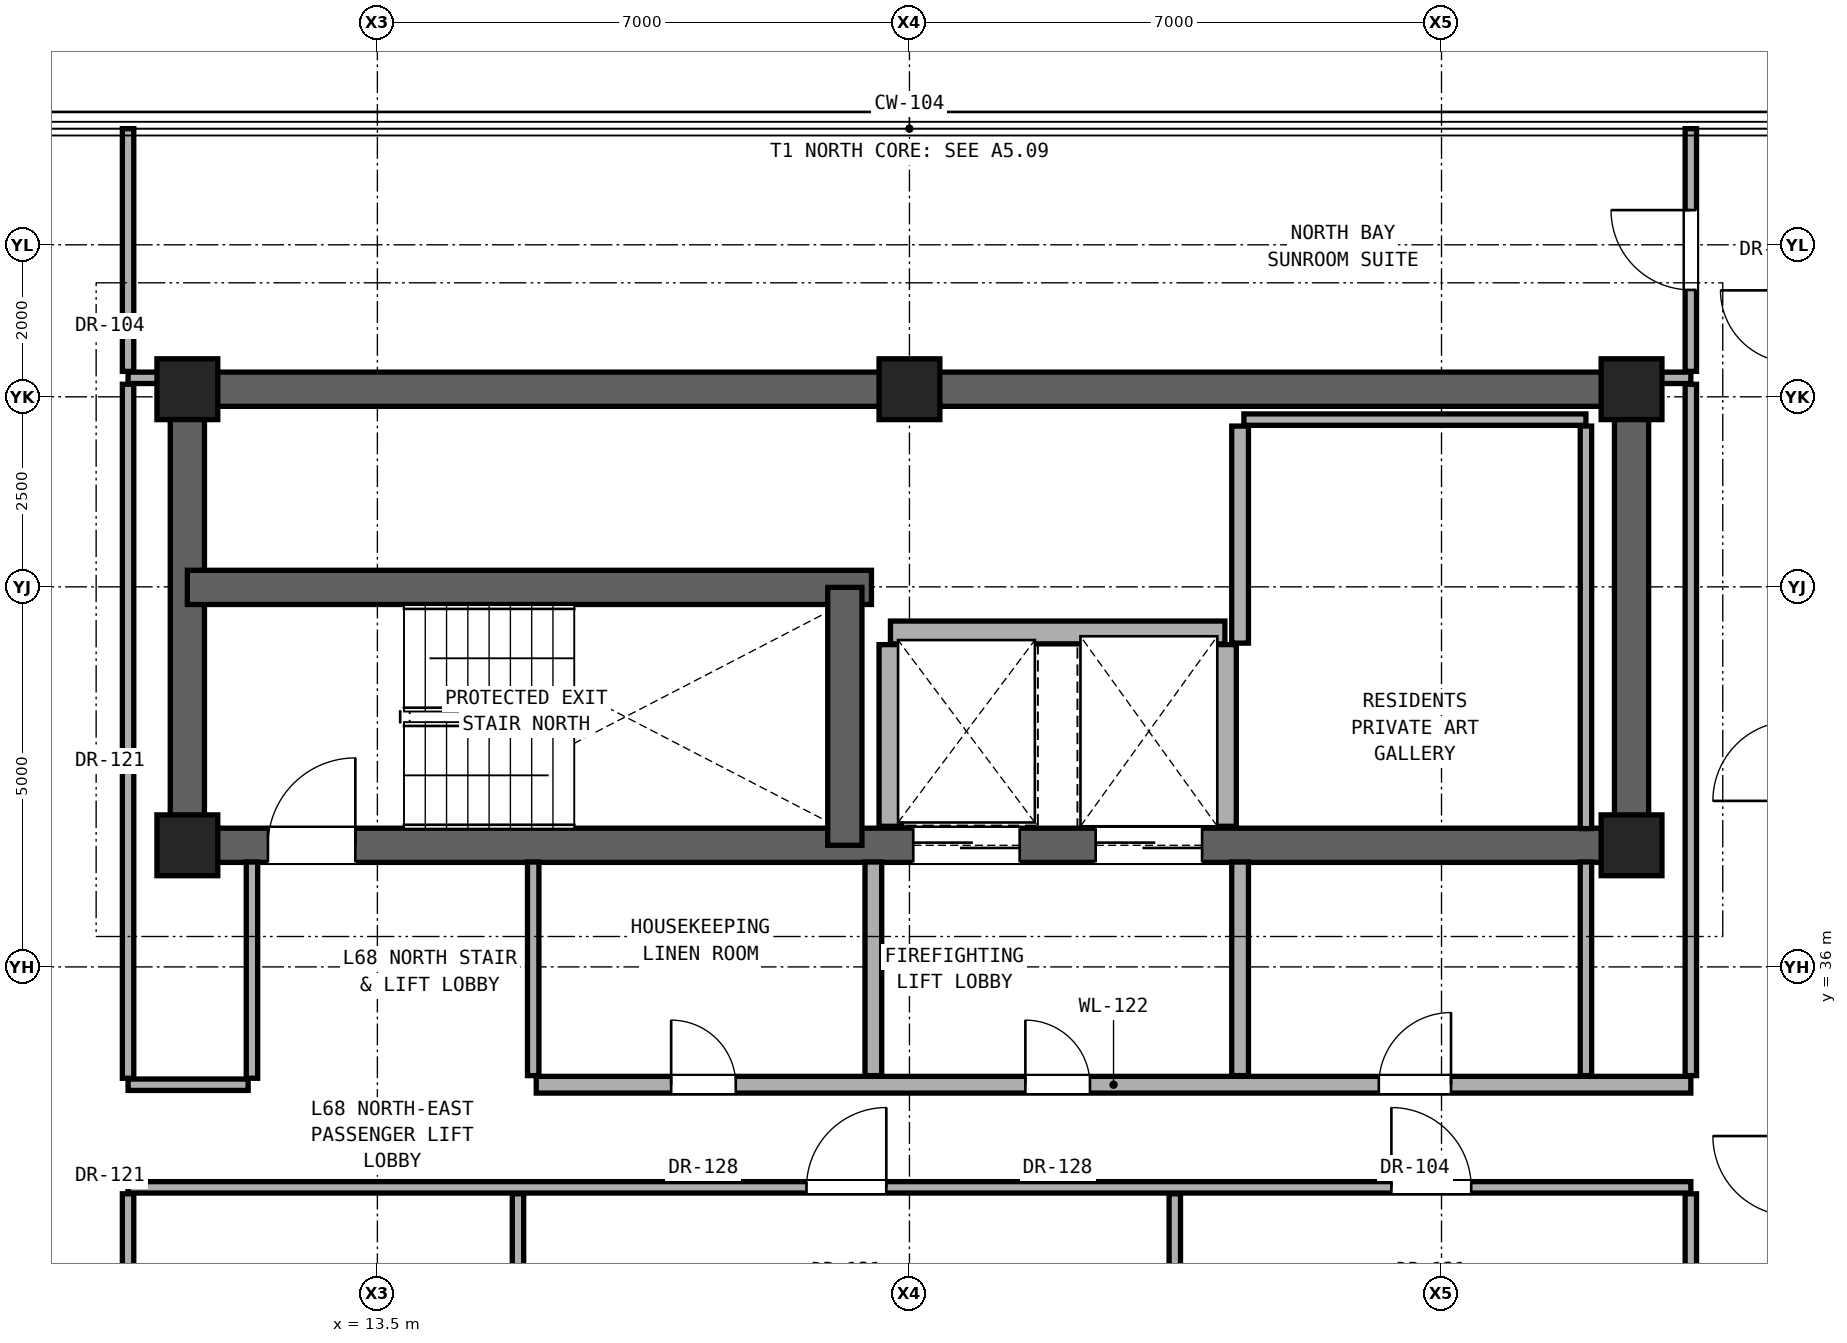
"""IFC4 building model, lengths in metres.
Left out: names, types, materials, properties, quantities, classifications, styles, units other than length and angle.
Written with IfcOpenShell. Run it as: python <this file> out.ifc"""

import sys

from ifc_helpers import new_model, si_unit, direction, frame, frame_2d, origin, origin_2d, place, context, subcontext, project, spatial, rectangle, extrude, element, fill, save


model = new_model("IFC4")
c1 = context("Model", 3, precision=1e-05, world=origin(), true_north=direction((0.0, 1.0)))
c2 = subcontext(c1, "Body", "Model", "MODEL_VIEW")
j1 = project(units=[si_unit("LENGTHUNIT", "METRE"), si_unit("PLANEANGLEUNIT", "RADIAN")], contexts=[c1])
p1 = place(None, origin())
s1 = spatial("IfcSite", under=j1, at=p1, CompositionType="ELEMENT")
p2 = place(p1, origin())
s2 = spatial("IfcBuilding", under=s1, at=p2, CompositionType="ELEMENT")
p3 = place(p2, frame((0.0, 0.0, 239.2)))
s3 = spatial("IfcBuildingStorey", under=s2, at=p3, CompositionType="ELEMENT", Elevation=239.2)
for number, where, z_axis, x_axis in (
    (1, (11.0, 37.6, 0.0), (0.0, 0.0, 1.0), (1.0, 0.0, 0.0)),
    (2, (30.0, 37.6, 0.0), (0.0, 0.0, 1.0), (1.0, 0.0, 0.0)),
    (3, (11.0, 43.6, 0.0), (0.0, 0.0, 1.0), (1.0, 0.0, 0.0)),
    (4, (20.5, 43.6, 0.0), (0.0, 0.0, 1.0), (1.0, 0.0, 0.0)),
    (5, (30.0, 43.6, 0.0), (0.0, 0.0, 1.0), (1.0, 0.0, 0.0)),
):
    element("IfcColumn", number, at=place(p3, frame(where, z_axis=z_axis, x_axis=x_axis)), inside=s3, PredefinedType="COLUMN", context=c2, shape_type="SweptSolid", body=[
        extrude(rectangle(XDim=0.8, YDim=0.8, at=origin_2d()), origin(), (0.0, 0.0, 1.0), 3.3),
    ])
p4 = place(p3, frame((11.0, 43.6, 0.0), z_axis=(0.0, 0.0, 1.0), x_axis=(1.0, 0.0, 0.0)))
e6 = element("IfcWall", 6, at=p4, inside=s3, PredefinedType="SHEAR", context=c2, shape_type="SweptSolid", body=[
    extrude(rectangle(XDim=19.0, YDim=0.45, at=frame_2d((9.5, 0.0))), origin(), (0.0, 0.0, 1.0), 3.1),
])
for number, where, z_axis, x_axis in (
    (7, (11.0, 37.6, 0.0), (0.0, 0.0, 1.0), (0.0, 1.0, 0.0)),
    (8, (30.0, 37.6, 0.0), (0.0, 0.0, 1.0), (0.0, 1.0, 0.0)),
):
    element("IfcWall", number, at=place(p3, frame(where, z_axis=z_axis, x_axis=x_axis)), inside=s3, PredefinedType="SHEAR", context=c2, shape_type="SweptSolid", body=[
        extrude(rectangle(XDim=6.0, YDim=0.45, at=frame_2d((3.0, 0.0))), origin(), (0.0, 0.0, 1.0), 3.1),
    ])
p5 = place(p3, frame((11.0, 37.6, 0.0), z_axis=(0.0, 0.0, 1.0), x_axis=(1.0, 0.0, 0.0)))
e9 = element("IfcWall", 9, at=p5, inside=s3, PredefinedType="SHEAR", context=c2, shape_type="SweptSolid", body=[
    extrude(rectangle(XDim=19.0, YDim=0.45, at=frame_2d((9.5, 0.0))), origin(), (0.0, 0.0, 1.0), 3.1),
])
p6 = place(p5, frame((1.06, 0.0, 0.0)))
e10 = element("IfcOpeningElement", 10, at=p6, cuts=e9, PredefinedType="OPENING", context=c2, shape_type="SweptSolid", body=[
    extrude(rectangle(XDim=1.15, YDim=2.2, at=frame_2d((0.575, 1.1))), frame((0.0, 0.235, 0.0), z_axis=(0.0, -1.0, 0.0), x_axis=(1.0, 0.0, 0.0)), (0.0, 0.0, 1.0), 0.47),
])
p7 = place(p5, frame((9.55, 0.0, 0.0)))
e11 = element("IfcOpeningElement", 11, at=p7, cuts=e9, PredefinedType="OPENING", context=c2, shape_type="SweptSolid", body=[
    extrude(rectangle(XDim=1.4, YDim=2.35, at=frame_2d((0.7, 1.175))), frame((0.0, 0.235, 0.0), z_axis=(0.0, -1.0, 0.0), x_axis=(1.0, 0.0, 0.0)), (0.0, 0.0, 1.0), 0.47),
])
p8 = place(p5, frame((11.95, 0.0, 0.0)))
e12 = element("IfcOpeningElement", 12, at=p8, cuts=e9, PredefinedType="OPENING", context=c2, shape_type="SweptSolid", body=[
    extrude(rectangle(XDim=1.4, YDim=2.35, at=frame_2d((0.7, 1.175))), frame((0.0, 0.235, 0.0), z_axis=(0.0, -1.0, 0.0), x_axis=(1.0, 0.0, 0.0)), (0.0, 0.0, 1.0), 0.47),
])
p9 = place(p3, frame((11.0, 40.993, 0.0), z_axis=(0.0, 0.0, 1.0), x_axis=(1.0, 0.0, 0.0)))
e13 = element("IfcWall", 13, at=p9, inside=s3, PredefinedType="SHEAR", context=c2, shape_type="SweptSolid", body=[
    extrude(rectangle(XDim=9.0, YDim=0.45, at=frame_2d((4.5, 0.0))), origin(), (0.0, 0.0, 1.0), 3.1),
])
p10 = place(p3, frame((19.65, 37.6, 0.0), z_axis=(0.0, 0.0, 1.0), x_axis=(0.0, 1.0, 0.0)))
e14 = element("IfcWall", 14, at=p10, inside=s3, PredefinedType="SHEAR", context=c2, shape_type="SweptSolid", body=[
    extrude(rectangle(XDim=3.393, YDim=0.45, at=frame_2d((1.696, 0.0))), origin(), (0.0, 0.0, 1.0), 3.1),
])
p11 = place(p3, frame((10.22, 33.1, 0.0), z_axis=(0.0, 0.0, 1.0), x_axis=(1.0, 0.0, 0.0)))
e15 = element("IfcWall", 15, at=p11, inside=s3, PredefinedType="PARTITIONING", context=c2, shape_type="SweptSolid", body=[
    extrude(rectangle(XDim=20.56, YDim=0.15, at=frame_2d((10.28, 0.0))), origin(), (0.0, 0.0, 1.0), 2.236),
])
p12 = place(p11, frame((8.926, 0.0, 0.0)))
e16 = element("IfcOpeningElement", 16, at=p12, cuts=e15, PredefinedType="OPENING", context=c2, shape_type="SweptSolid", body=[
    extrude(rectangle(XDim=1.05, YDim=2.2, at=frame_2d((0.525, 1.1))), frame((0.0, 0.085, 0.0), z_axis=(0.0, -1.0, 0.0), x_axis=(1.0, 0.0, 0.0)), (0.0, 0.0, 1.0), 0.17),
])
p13 = place(p11, frame((16.621, 0.0, 0.0)))
e17 = element("IfcOpeningElement", 17, at=p13, cuts=e15, PredefinedType="OPENING", context=c2, shape_type="SweptSolid", body=[
    extrude(rectangle(XDim=1.05, YDim=2.2, at=frame_2d((0.525, 1.1))), frame((0.0, 0.085, 0.0), z_axis=(0.0, -1.0, 0.0), x_axis=(1.0, 0.0, 0.0)), (0.0, 0.0, 1.0), 0.17),
])
p14 = place(p3, frame((10.22, 34.45, 0.0), z_axis=(0.0, 0.0, 1.0), x_axis=(1.0, 0.0, 0.0)))
e18 = element("IfcWall", 18, at=p14, inside=s3, PredefinedType="PARTITIONING", context=c2, shape_type="SweptSolid", body=[
    extrude(rectangle(XDim=1.58, YDim=0.15, at=frame_2d((0.79, 0.0))), origin(), (0.0, 0.0, 1.0), 2.236),
])
p15 = place(p3, frame((15.59, 34.45, 0.0), z_axis=(0.0, 0.0, 1.0), x_axis=(1.0, 0.0, 0.0)))
e19 = element("IfcWall", 19, at=p15, inside=s3, PredefinedType="SOLIDWALL", context=c2, shape_type="SweptSolid", body=[
    extrude(rectangle(XDim=15.19, YDim=0.22, at=frame_2d((7.595, 0.0))), origin(), (0.0, 0.0, 1.0), 2.236),
])
p16 = place(p15, frame((6.435, 0.0, 0.0)))
e20 = element("IfcOpeningElement", 20, at=p16, cuts=e19, PredefinedType="OPENING", context=c2, shape_type="SweptSolid", body=[
    extrude(rectangle(XDim=0.85, YDim=2.01, at=frame_2d((0.425, 1.005))), frame((0.0, 0.12, 0.0), z_axis=(0.0, -1.0, 0.0), x_axis=(1.0, 0.0, 0.0)), (0.0, 0.0, 1.0), 0.24),
])
p17 = place(p15, frame((11.085, 0.0, 0.0)))
e21 = element("IfcOpeningElement", 21, at=p17, cuts=e19, PredefinedType="OPENING", context=c2, shape_type="SweptSolid", body=[
    extrude(rectangle(XDim=0.95, YDim=2.15, at=frame_2d((0.475, 1.075))), frame((0.0, 0.12, 0.0), z_axis=(0.0, -1.0, 0.0), x_axis=(1.0, 0.0, 0.0)), (0.0, 0.0, 1.0), 0.24),
])
p18 = place(p15, frame((1.775, 0.0, 0.0)))
e22 = element("IfcOpeningElement", 22, at=p18, cuts=e19, PredefinedType="OPENING", context=c2, shape_type="SweptSolid", body=[
    extrude(rectangle(XDim=0.85, YDim=2.01, at=frame_2d((0.425, 1.005))), frame((0.0, 0.12, 0.0), z_axis=(0.0, -1.0, 0.0), x_axis=(1.0, 0.0, 0.0)), (0.0, 0.0, 1.0), 0.24),
])
p19 = place(p3, frame((20.25, 40.4, 0.0), z_axis=(0.0, 0.0, 1.0), x_axis=(1.0, 0.0, 0.0)))
e23 = element("IfcWall", 23, at=p19, inside=s3, PredefinedType="SOLIDWALL", context=c2, shape_type="SweptSolid", body=[
    extrude(rectangle(XDim=4.4, YDim=0.3, at=frame_2d((2.2, 0.0))), origin(), (0.0, 0.0, 1.0), 3.1),
])
p20 = place(p3, frame((24.9, 43.2, 0.0), z_axis=(0.0, 0.0, 1.0), x_axis=(1.0, 0.0, 0.0)))
e24 = element("IfcWall", 24, at=p20, inside=s3, PredefinedType="PARTITIONING", context=c2, shape_type="SweptSolid", body=[
    extrude(rectangle(XDim=4.5, YDim=0.15, at=frame_2d((2.25, 0.0))), origin(), (0.0, 0.0, 1.0), 3.1),
])
for number, where, z_axis, x_axis in (
    (25, (10.22, 43.75, 0.0), (0.0, 0.0, 1.0), (1.0, 0.0, 0.0)),
    (26, (30.22, 43.75, 0.0), (0.0, 0.0, 1.0), (1.0, 0.0, 0.0)),
):
    element("IfcWall", number, at=place(p3, frame(where, z_axis=z_axis, x_axis=x_axis)), inside=s3, PredefinedType="PARTITIONING", context=c2, shape_type="SweptSolid", body=[
        extrude(rectangle(XDim=0.56, YDim=0.15, at=frame_2d((0.28, 0.0))), origin(), (0.0, 0.0, 1.0), 3.1),
    ])
p21 = place(p3, frame((10.22, 22.935, 0.0), z_axis=(0.0, 0.0, 1.0), x_axis=(0.0, 1.0, 0.0)))
e27 = element("IfcWall", 27, at=p21, inside=s3, PredefinedType="PARTITIONING", context=c2, shape_type="SweptSolid", body=[
    extrude(rectangle(XDim=10.08, YDim=0.15, at=frame_2d((5.04, 0.0))), origin(), (0.0, 0.0, 1.0), 2.396),
])
p22 = place(p21, frame((4.565, 0.0, 0.0)))
e28 = element("IfcOpeningElement", 28, at=p22, cuts=e27, PredefinedType="OPENING", context=c2, shape_type="SweptSolid", body=[
    extrude(rectangle(XDim=0.95, YDim=2.15, at=frame_2d((0.475, 1.075))), frame((0.0, 0.085, 0.0), z_axis=(0.0, -1.0, 0.0), x_axis=(1.0, 0.0, 0.0)), (0.0, 0.0, 1.0), 0.17),
])
p23 = place(p3, frame((10.22, 34.535, 0.0), z_axis=(0.0, 0.0, 1.0), x_axis=(0.0, 1.0, 0.0)))
e29 = element("IfcWall", 29, at=p23, inside=s3, PredefinedType="PARTITIONING", context=c2, shape_type="SweptSolid", body=[
    extrude(rectangle(XDim=9.13, YDim=0.15, at=frame_2d((4.565, 0.0))), origin(), (0.0, 0.0, 1.0), 2.492),
])
p24 = place(p3, frame((10.22, 43.835, 0.0), z_axis=(0.0, 0.0, 1.0), x_axis=(0.0, 1.0, 0.0)))
e30 = element("IfcWall", 30, at=p24, inside=s3, PredefinedType="PARTITIONING", context=c2, shape_type="SweptSolid", body=[
    extrude(rectangle(XDim=3.193, YDim=0.15, at=frame_2d((1.597, 0.0))), origin(), (0.0, 0.0, 1.0), 3.1),
])
p25 = place(p3, frame((11.85, 34.535, 0.0), z_axis=(0.0, 0.0, 1.0), x_axis=(0.0, 1.0, 0.0)))
e31 = element("IfcWall", 31, at=p25, inside=s3, PredefinedType="PARTITIONING", context=c2, shape_type="SweptSolid", body=[
    extrude(rectangle(XDim=2.845, YDim=0.15, at=frame_2d((1.422, 0.0))), origin(), (0.0, 0.0, 1.0), 3.1),
])
p26 = place(p3, frame((15.35, 25.925, 0.0), z_axis=(0.0, 0.0, 1.0), x_axis=(0.0, 1.0, 0.0)))
e32 = element("IfcWall", 32, at=p26, inside=s3, PredefinedType="PARTITIONING", context=c2, shape_type="SweptSolid", body=[
    extrude(rectangle(XDim=7.09, YDim=0.15, at=frame_2d((3.545, 0.0))), origin(), (0.0, 0.0, 1.0), 2.236),
])
p27 = place(p3, frame((15.55, 34.57, 0.0), z_axis=(0.0, 0.0, 1.0), x_axis=(0.0, 1.0, 0.0)))
e33 = element("IfcWall", 33, at=p27, inside=s3, PredefinedType="PARTITIONING", context=c2, shape_type="SweptSolid", body=[
    extrude(rectangle(XDim=2.81, YDim=0.15, at=frame_2d((1.405, 0.0))), origin(), (0.0, 0.0, 1.0), 3.1),
])
p28 = place(p3, frame((20.025, 34.57, 0.0), z_axis=(0.0, 0.0, 1.0), x_axis=(0.0, 1.0, 0.0)))
e34 = element("IfcWall", 34, at=p28, inside=s3, PredefinedType="SOLIDWALL", context=c2, shape_type="SweptSolid", body=[
    extrude(rectangle(XDim=2.81, YDim=0.22, at=frame_2d((1.405, 0.0))), origin(), (0.0, 0.0, 1.0), 3.1),
])
p29 = place(p3, frame((20.25, 37.85, 0.0), z_axis=(0.0, 0.0, 1.0), x_axis=(0.0, 1.0, 0.0)))
e35 = element("IfcWall", 35, at=p29, inside=s3, PredefinedType="SOLIDWALL", context=c2, shape_type="SweptSolid", body=[
    extrude(rectangle(XDim=2.39, YDim=0.3, at=frame_2d((1.195, 0.0))), origin(), (0.0, 0.0, 1.0), 3.1),
])
p30 = place(p3, frame((23.991, 25.925, 0.0), z_axis=(0.0, 0.0, 1.0), x_axis=(0.0, 1.0, 0.0)))
e36 = element("IfcWall", 36, at=p30, inside=s3, PredefinedType="PARTITIONING", context=c2, shape_type="SweptSolid", body=[
    extrude(rectangle(XDim=7.09, YDim=0.15, at=frame_2d((3.545, 0.0))), origin(), (0.0, 0.0, 1.0), 2.236),
])
p31 = place(p3, frame((24.65, 37.85, 0.0), z_axis=(0.0, 0.0, 1.0), x_axis=(0.0, 1.0, 0.0)))
e37 = element("IfcWall", 37, at=p31, inside=s3, PredefinedType="SOLIDWALL", context=c2, shape_type="SweptSolid", body=[
    extrude(rectangle(XDim=2.39, YDim=0.3, at=frame_2d((1.195, 0.0))), origin(), (0.0, 0.0, 1.0), 3.1),
])
p32 = place(p3, frame((24.85, 34.57, 0.0), z_axis=(0.0, 0.0, 1.0), x_axis=(0.0, 1.0, 0.0)))
e38 = element("IfcWall", 38, at=p32, inside=s3, PredefinedType="SOLIDWALL", context=c2, shape_type="SweptSolid", body=[
    extrude(rectangle(XDim=2.81, YDim=0.22, at=frame_2d((1.405, 0.0))), origin(), (0.0, 0.0, 1.0), 3.1),
])
p33 = place(p3, frame((24.85, 40.26, 0.0), z_axis=(0.0, 0.0, 1.0), x_axis=(0.0, 1.0, 0.0)))
e39 = element("IfcWall", 39, at=p33, inside=s3, PredefinedType="SOLIDWALL", context=c2, shape_type="SweptSolid", body=[
    extrude(rectangle(XDim=2.855, YDim=0.22, at=frame_2d((1.427, 0.0))), origin(), (0.0, 0.0, 1.0), 3.1),
])
p34 = place(p3, frame((29.4, 34.57, 0.0), z_axis=(0.0, 0.0, 1.0), x_axis=(0.0, 1.0, 0.0)))
e40 = element("IfcWall", 40, at=p34, inside=s3, PredefinedType="PARTITIONING", context=c2, shape_type="SweptSolid", body=[
    extrude(rectangle(XDim=2.81, YDim=0.15, at=frame_2d((1.405, 0.0))), origin(), (0.0, 0.0, 1.0), 3.1),
])
p35 = place(p3, frame((29.4, 37.82, 0.0), z_axis=(0.0, 0.0, 1.0), x_axis=(0.0, 1.0, 0.0)))
e41 = element("IfcWall", 41, at=p35, inside=s3, PredefinedType="PARTITIONING", context=c2, shape_type="SweptSolid", body=[
    extrude(rectangle(XDim=5.295, YDim=0.15, at=frame_2d((2.647, 0.0))), origin(), (0.0, 0.0, 1.0), 3.1),
])
p36 = place(p3, frame((30.78, 25.925, 0.0), z_axis=(0.0, 0.0, 1.0), x_axis=(0.0, 1.0, 0.0)))
e42 = element("IfcWall", 42, at=p36, inside=s3, PredefinedType="PARTITIONING", context=c2, shape_type="SweptSolid", body=[
    extrude(rectangle(XDim=7.09, YDim=0.15, at=frame_2d((3.545, 0.0))), origin(), (0.0, 0.0, 1.0), 2.396),
])
p37 = place(p3, frame((30.78, 34.57, 0.0), z_axis=(0.0, 0.0, 1.0), x_axis=(0.0, 1.0, 0.0)))
e43 = element("IfcWall", 43, at=p37, inside=s3, PredefinedType="PARTITIONING", context=c2, shape_type="SweptSolid", body=[
    extrude(rectangle(XDim=9.095, YDim=0.15, at=frame_2d((4.547, 0.0))), origin(), (0.0, 0.0, 1.0), 2.492),
])
p38 = place(p3, frame((30.78, 43.835, 0.0), z_axis=(0.0, 0.0, 1.0), x_axis=(0.0, 1.0, 0.0)))
e44 = element("IfcWall", 44, at=p38, inside=s3, PredefinedType="PARTITIONING", context=c2, shape_type="SweptSolid", body=[
    extrude(rectangle(XDim=3.193, YDim=0.15, at=frame_2d((1.597, 0.0))), origin(), (0.0, 0.0, 1.0), 3.1),
])
p39 = place(p38, frame((1.072, 0.0, 0.0)))
e45 = element("IfcOpeningElement", 45, at=p39, cuts=e44, PredefinedType="OPENING", context=c2, shape_type="SweptSolid", body=[
    extrude(rectangle(XDim=1.05, YDim=2.2, at=frame_2d((0.525, 1.1))), frame((0.0, 0.085, 0.0), z_axis=(0.0, -1.0, 0.0), x_axis=(1.0, 0.0, 0.0)), (0.0, 0.0, 1.0), 0.17),
])
p40 = place(p6, origin())
e46 = element("IfcDoor", 46, at=p40, inside=s3, OperationType="SINGLE_SWING_RIGHT", PredefinedType="DOOR", context=c2, shape_type="SweptSolid", body=[
    extrude(rectangle(XDim=1.15, YDim=2.2, at=frame_2d((0.575, 1.1))), frame((0.0, 0.025, 0.0), z_axis=(0.0, -1.0, 0.0), x_axis=(1.0, 0.0, 0.0)), (0.0, 0.0, 1.0), 0.05),
])
fill(e10, e46)
p41 = place(p16, origin())
e47 = element("IfcDoor", 47, at=p41, inside=s3, OperationType="SINGLE_SWING_LEFT", PredefinedType="DOOR", context=c2, shape_type="SweptSolid", body=[
    extrude(rectangle(XDim=0.85, YDim=2.01, at=frame_2d((0.425, 1.005))), frame((0.0, 0.025, 0.0), z_axis=(0.0, -1.0, 0.0), x_axis=(1.0, 0.0, 0.0)), (0.0, 0.0, 1.0), 0.05),
])
fill(e20, e47)
p42 = place(p17, origin())
e48 = element("IfcDoor", 48, at=p42, inside=s3, OperationType="SINGLE_SWING_RIGHT", PredefinedType="DOOR", context=c2, shape_type="SweptSolid", body=[
    extrude(rectangle(XDim=0.95, YDim=2.15, at=frame_2d((0.475, 1.075))), frame((0.0, 0.025, 0.0), z_axis=(0.0, -1.0, 0.0), x_axis=(1.0, 0.0, 0.0)), (0.0, 0.0, 1.0), 0.05),
])
fill(e21, e48)
p43 = place(p18, origin())
e49 = element("IfcDoor", 49, at=p43, inside=s3, OperationType="SINGLE_SWING_LEFT", PredefinedType="DOOR", context=c2, shape_type="SweptSolid", body=[
    extrude(rectangle(XDim=0.85, YDim=2.01, at=frame_2d((0.425, 1.005))), frame((0.0, 0.025, 0.0), z_axis=(0.0, -1.0, 0.0), x_axis=(1.0, 0.0, 0.0)), (0.0, 0.0, 1.0), 0.05),
])
fill(e22, e49)
p44 = place(p12, origin())
e50 = element("IfcDoor", 50, at=p44, inside=s3, OperationType="SINGLE_SWING_RIGHT", PredefinedType="DOOR", context=c2, shape_type="SweptSolid", body=[
    extrude(rectangle(XDim=1.05, YDim=2.2, at=frame_2d((0.525, 1.1))), frame((0.0, 0.025, 0.0), z_axis=(0.0, -1.0, 0.0), x_axis=(1.0, 0.0, 0.0)), (0.0, 0.0, 1.0), 0.05),
])
fill(e16, e50)
p45 = place(p13, origin())
e51 = element("IfcDoor", 51, at=p45, inside=s3, OperationType="SINGLE_SWING_LEFT", PredefinedType="DOOR", context=c2, shape_type="SweptSolid", body=[
    extrude(rectangle(XDim=1.05, YDim=2.2, at=frame_2d((0.525, 1.1))), frame((0.0, 0.025, 0.0), z_axis=(0.0, -1.0, 0.0), x_axis=(1.0, 0.0, 0.0)), (0.0, 0.0, 1.0), 0.05),
])
fill(e17, e51)
p46 = place(p39, origin())
e52 = element("IfcDoor", 52, at=p46, inside=s3, OperationType="SINGLE_SWING_RIGHT", PredefinedType="DOOR", context=c2, shape_type="SweptSolid", body=[
    extrude(rectangle(XDim=1.05, YDim=2.2, at=frame_2d((0.525, 1.1))), frame((0.0, 0.025, 0.0), z_axis=(0.0, -1.0, 0.0), x_axis=(1.0, 0.0, 0.0)), (0.0, 0.0, 1.0), 0.05),
])
fill(e45, e52)
p47 = place(p7, origin())
e53 = element("IfcDoor", 53, at=p47, inside=s3, OperationType="DOUBLE_DOOR_SLIDING", PredefinedType="DOOR", context=c2, shape_type="SweptSolid", body=[
    extrude(rectangle(XDim=1.4, YDim=2.35, at=frame_2d((0.7, 1.175))), frame((0.0, 0.025, 0.0), z_axis=(0.0, -1.0, 0.0), x_axis=(1.0, 0.0, 0.0)), (0.0, 0.0, 1.0), 0.05),
])
fill(e11, e53)
p48 = place(p8, origin())
e54 = element("IfcDoor", 54, at=p48, inside=s3, OperationType="DOUBLE_DOOR_SLIDING", PredefinedType="DOOR", context=c2, shape_type="SweptSolid", body=[
    extrude(rectangle(XDim=1.4, YDim=2.35, at=frame_2d((0.7, 1.175))), frame((0.0, 0.025, 0.0), z_axis=(0.0, -1.0, 0.0), x_axis=(1.0, 0.0, 0.0)), (0.0, 0.0, 1.0), 0.05),
])
fill(e12, e54)
save(model, sys.argv[1])
